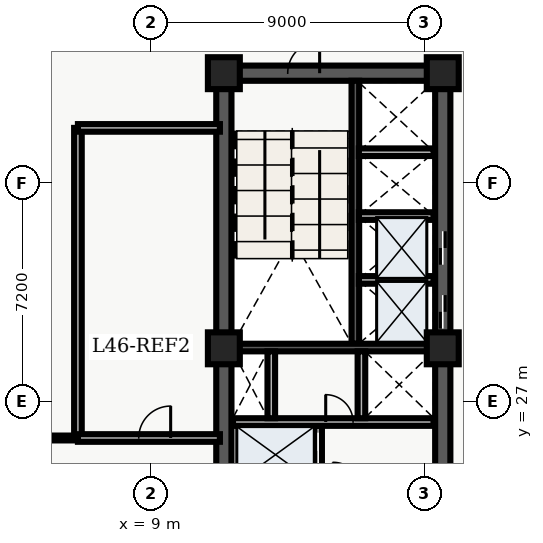
"""IFC4 building model, lengths in metres.
Left out: names, types, materials, properties, quantities, classifications, styles, units other than length and angle.
Written with IfcOpenShell. Run it as: python <this file> out.ifc"""

import sys

from ifc_helpers import new_model, entity, si_unit, converted_unit, direction, frame, origin_with_axes, origin_2d_with_axis, place, context, subcontext, project, spatial, polyline, rectangle, outline, extrude, element, fill, save


model = new_model("IFC4")
c1 = context("Model", 3, precision=1e-05, world=origin_with_axes(), true_north=direction((0.0, 1.0)))
c2 = subcontext(c1, "Body", "Model", "MODEL_VIEW")
j1 = project(units=[si_unit("LENGTHUNIT", "METRE"), converted_unit("PLANEANGLEUNIT", "DEGREE", entity("IfcPlaneAngleMeasure", 0.017), si_unit("PLANEANGLEUNIT", "RADIAN"), dimensions=[0, 0, 0, 0, 0, 0, 0])], contexts=[c1])
p1 = place(None, origin_with_axes())
s1 = spatial("IfcSite", under=j1, at=p1, CompositionType="ELEMENT")
p2 = place(p1, origin_with_axes())
s2 = spatial("IfcBuilding", under=s1, at=p2, CompositionType="ELEMENT")
p3 = place(p2, frame((0.0, 0.0, 187.5), z_axis=(0.0, 0.0, 1.0), x_axis=(1.0, 0.0, 0.0)))
s3 = spatial("IfcBuildingStorey", under=s2, at=p3, CompositionType="ELEMENT", Elevation=187.5)
p4 = place(p3, frame((11.4, 10.8, 0.0), z_axis=(0.0, 0.0, 1.0), x_axis=(0.0, 1.0, 0.0)))
e1 = element("IfcWall", 1, at=p4, inside=s3, PredefinedType="SHEAR", context=c2, shape_type="SweptSolid", body=[
    extrude(outline(polyline([(0.0, -0.25), (27.0, -0.25), (27.0, 0.25), (0.0, 0.25), (0.0, -0.25)])), origin_with_axes(), (0.0, 0.0, 1.0), 4.86),
])
p5 = place(p3, frame((11.4, 37.8, 0.0), z_axis=(0.0, 0.0, 1.0), x_axis=(1.0, 0.0, 0.0)))
e2 = element("IfcWall", 2, at=p5, inside=s3, PredefinedType="SHEAR", context=c2, shape_type="SweptSolid", body=[
    extrude(outline(polyline([(0.0, -0.25), (7.2, -0.25), (7.2, 0.25), (0.0, 0.25), (0.0, -0.25)])), origin_with_axes(), (0.0, 0.0, 1.0), 4.86),
])
p6 = place(p5, frame((2.625, 0.0, 0.0), z_axis=(0.0, 0.0, 1.0), x_axis=(1.0, 0.0, 0.0)))
e3 = element("IfcOpeningElement", 3, at=p6, cuts=e2, PredefinedType="OPENING", context=c2, shape_type="SweptSolid", body=[
    extrude(rectangle(XDim=1.05, YDim=0.52, at=origin_2d_with_axis()), origin_with_axes(), (0.0, 0.0, 1.0), 2.15),
])
p7 = place(p3, frame((18.6, 24.3, 0.0), z_axis=(0.0, 0.0, 1.0), x_axis=(0.0, 1.0, 0.0)))
e4 = element("IfcWall", 4, at=p7, inside=s3, PredefinedType="SHEAR", context=c2, shape_type="SweptSolid", body=[
    extrude(outline(polyline([(0.0, -0.25), (13.5, -0.25), (13.5, 0.25), (0.0, 0.25), (0.0, -0.25)])), origin_with_axes(), (0.0, 0.0, 1.0), 4.86),
])
p8 = place(p7, frame((5.65, 0.0, 0.0), z_axis=(0.0, 0.0, 1.0), x_axis=(1.0, 0.0, 0.0)))
e5 = element("IfcOpeningElement", 5, at=p8, cuts=e4, PredefinedType="OPENING", context=c2, shape_type="SweptSolid", body=[
    extrude(rectangle(XDim=1.1, YDim=0.52, at=origin_2d_with_axis()), origin_with_axes(), (0.0, 0.0, 1.0), 2.15),
])
p9 = place(p7, frame((7.75, 0.0, 0.0), z_axis=(0.0, 0.0, 1.0), x_axis=(1.0, 0.0, 0.0)))
e6 = element("IfcOpeningElement", 6, at=p9, cuts=e4, PredefinedType="OPENING", context=c2, shape_type="SweptSolid", body=[
    extrude(rectangle(XDim=1.1, YDim=0.52, at=origin_2d_with_axis()), origin_with_axes(), (0.0, 0.0, 1.0), 2.15),
])
p10 = place(p3, frame((15.725, 28.9, 0.0), z_axis=(0.0, 0.0, 1.0), x_axis=(0.0, 1.0, 0.0)))
e7 = element("IfcWall", 7, at=p10, inside=s3, PredefinedType="SHEAR", context=c2, shape_type="SweptSolid", body=[
    extrude(outline(polyline([(0.0, -0.125), (8.65, -0.125), (8.65, 0.125), (0.0, 0.125), (0.0, -0.125)])), origin_with_axes(), (0.0, 0.0, 1.0), 4.86),
])
p11 = place(p3, frame((11.65, 28.775, 0.0), z_axis=(0.0, 0.0, 1.0), x_axis=(1.0, 0.0, 0.0)))
e8 = element("IfcWall", 8, at=p11, inside=s3, PredefinedType="SHEAR", context=c2, shape_type="SweptSolid", body=[
    extrude(outline(polyline([(0.0, -0.125), (6.7, -0.125), (6.7, 0.125), (0.0, 0.125), (0.0, -0.125)])), origin_with_axes(), (0.0, 0.0, 1.0), 4.86),
])
p12 = place(p3, frame((14.5, 19.95, 0.0), z_axis=(0.0, 0.0, 1.0), x_axis=(0.0, 1.0, 0.0)))
e9 = element("IfcWall", 9, at=p12, inside=s3, PredefinedType="SOLIDWALL", context=c2, shape_type="SweptSolid", body=[
    extrude(outline(polyline([(0.0, -0.125), (6.25, -0.125), (6.25, 0.125), (0.0, 0.125), (0.0, -0.125)])), origin_with_axes(), (0.0, 0.0, 1.0), 3.6),
])
p13 = place(p12, frame((1.025, 0.0, 0.0), z_axis=(0.0, 0.0, 1.0), x_axis=(1.0, 0.0, 0.0)))
e10 = element("IfcOpeningElement", 10, at=p13, cuts=e9, PredefinedType="OPENING", context=c2, shape_type="SweptSolid", body=[
    extrude(rectangle(XDim=1.1, YDim=0.27, at=origin_2d_with_axis()), origin_with_axes(), (0.0, 0.0, 1.0), 2.15),
])
p14 = place(p12, frame((2.975, 0.0, 0.0), z_axis=(0.0, 0.0, 1.0), x_axis=(1.0, 0.0, 0.0)))
e11 = element("IfcOpeningElement", 11, at=p14, cuts=e9, PredefinedType="OPENING", context=c2, shape_type="SweptSolid", body=[
    extrude(rectangle(XDim=1.1, YDim=0.27, at=origin_2d_with_axis()), origin_with_axes(), (0.0, 0.0, 1.0), 2.15),
])
p15 = place(p12, frame((5.425, 0.0, 0.0), z_axis=(0.0, 0.0, 1.0), x_axis=(1.0, 0.0, 0.0)))
e12 = element("IfcOpeningElement", 12, at=p15, cuts=e9, PredefinedType="OPENING", context=c2, shape_type="SweptSolid", body=[
    extrude(rectangle(XDim=1.2, YDim=0.27, at=origin_2d_with_axis()), origin_with_axes(), (0.0, 0.0, 1.0), 2.15),
])
p16 = place(p3, frame((11.7, 26.325, 0.0), z_axis=(0.0, 0.0, 1.0), x_axis=(1.0, 0.0, 0.0)))
e13 = element("IfcWall", 13, at=p16, inside=s3, PredefinedType="SOLIDWALL", context=c2, shape_type="SweptSolid", body=[
    extrude(outline(polyline([(0.0, -0.125), (6.6, -0.125), (6.6, 0.125), (0.0, 0.125), (0.0, -0.125)])), origin_with_axes(), (0.0, 0.0, 1.0), 3.6),
])
p17 = place(p16, frame((3.5, 0.0, 0.0), z_axis=(0.0, 0.0, 1.0), x_axis=(1.0, 0.0, 0.0)))
e14 = element("IfcOpeningElement", 14, at=p17, cuts=e13, PredefinedType="OPENING", context=c2, shape_type="SweptSolid", body=[
    extrude(rectangle(XDim=0.9, YDim=0.27, at=origin_2d_with_axis()), origin_with_axes(), (0.0, 0.0, 1.0), 2.15),
])
for number, where, z_axis, x_axis in (
    (15, (12.96, 26.45, 0.0), (0.0, 0.0, 1.0), (0.0, 1.0, 0.0)),
    (16, (15.925, 26.45, 0.0), (0.0, 0.0, 1.0), (0.0, 1.0, 0.0)),
):
    element("IfcWall", number, at=place(p3, frame(where, z_axis=z_axis, x_axis=x_axis)), inside=s3, PredefinedType="SOLIDWALL", context=c2, shape_type="SweptSolid", body=[
        extrude(outline(polyline([(0.0, -0.125), (2.2, -0.125), (2.2, 0.125), (0.0, 0.125), (0.0, -0.125)])), origin_with_axes(), (0.0, 0.0, 1.0), 3.6),
    ])
for number, where, z_axis, x_axis in (
    (17, (11.4, 28.75, 0.0), (0.0, 0.0, 1.0), (1.0, 0.0, 0.0)),
    (18, (11.4, 37.8, 0.0), (0.0, 0.0, 1.0), (1.0, 0.0, 0.0)),
    (19, (18.6, 28.75, 0.0), (0.0, 0.0, 1.0), (1.0, 0.0, 0.0)),
    (20, (18.6, 37.8, 0.0), (0.0, 0.0, 1.0), (1.0, 0.0, 0.0)),
):
    element("IfcColumn", number, at=place(p3, frame(where, z_axis=z_axis, x_axis=x_axis)), inside=s3, PredefinedType="COLUMN", context=c2, shape_type="SweptSolid", body=[
        extrude(rectangle(XDim=1.05, YDim=1.05, at=origin_2d_with_axis()), origin_with_axes(), (0.0, 0.0, 1.0), 5.1),
    ])
for number, where, z_axis, x_axis in (
    (21, (15.84, 31.0, 0.0), (0.0, 0.0, 1.0), (1.0, 0.0, 0.0)),
    (22, (15.84, 33.1, 0.0), (0.0, 0.0, 1.0), (1.0, 0.0, 0.0)),
    (23, (15.84, 35.2, 0.0), (0.0, 0.0, 1.0), (1.0, 0.0, 0.0)),
):
    element("IfcWall", number, at=place(p3, frame(where, z_axis=z_axis, x_axis=x_axis)), inside=s3, PredefinedType="SOLIDWALL", context=c2, shape_type="SweptSolid", body=[
        extrude(outline(polyline([(0.0, -0.125), (2.46, -0.125), (2.46, 0.125), (0.0, 0.125), (0.0, -0.125)])), origin_with_axes(), (0.0, 0.0, 1.0), 3.2),
    ])
p18 = place(p3, frame((4.8, 25.8, 0.0), z_axis=(0.0, 0.0, 1.0), x_axis=(1.0, 0.0, 0.0)))
e24 = element("IfcWall", 24, at=p18, inside=s3, PredefinedType="PARTITIONING", context=c2, shape_type="SweptSolid", body=[
    extrude(outline(polyline([(0.0, -0.08), (1.8, -0.08), (1.8, 0.08), (0.0, 0.08), (0.0, -0.08)])), origin_with_axes(), (0.0, 0.0, 1.0), 3.2),
])
p19 = place(p3, frame((6.6, 25.8, 0.0), z_axis=(0.0, 0.0, 1.0), x_axis=(0.0, 1.0, 0.0)))
e25 = element("IfcWall", 25, at=p19, inside=s3, PredefinedType="SOLIDWALL", context=c2, shape_type="SweptSolid", body=[
    extrude(outline(polyline([(0.0, -0.125), (10.2, -0.125), (10.2, 0.125), (0.0, 0.125), (0.0, -0.125)])), origin_with_axes(), (0.0, 0.0, 1.0), 3.2),
])
p20 = place(p3, frame((6.6, 25.8, 0.0), z_axis=(0.0, 0.0, 1.0), x_axis=(1.0, 0.0, 0.0)))
e26 = element("IfcWall", 26, at=p20, inside=s3, PredefinedType="SOLIDWALL", context=c2, shape_type="SweptSolid", body=[
    extrude(outline(polyline([(0.0, -0.125), (4.67, -0.125), (4.67, 0.125), (0.0, 0.125), (0.0, -0.125)])), origin_with_axes(), (0.0, 0.0, 1.0), 3.2),
])
p21 = place(p20, frame((2.525, 0.0, 0.0), z_axis=(0.0, 0.0, 1.0), x_axis=(1.0, 0.0, 0.0)))
e27 = element("IfcOpeningElement", 27, at=p21, cuts=e26, PredefinedType="OPENING", context=c2, shape_type="SweptSolid", body=[
    extrude(rectangle(XDim=1.05, YDim=0.27, at=origin_2d_with_axis()), origin_with_axes(), (0.0, 0.0, 1.0), 2.15),
])
p22 = place(p3, frame((6.6, 36.0, 0.0), z_axis=(0.0, 0.0, 1.0), x_axis=(1.0, 0.0, 0.0)))
e28 = element("IfcWall", 28, at=p22, inside=s3, PredefinedType="SOLIDWALL", context=c2, shape_type="SweptSolid", body=[
    extrude(outline(polyline([(0.0, -0.125), (4.67, -0.125), (4.67, 0.125), (0.0, 0.125), (0.0, -0.125)])), origin_with_axes(), (0.0, 0.0, 1.0), 3.2),
])
p23 = place(p7, frame((5.65, 0.0, 0.0), z_axis=(0.0, 0.0, 1.0), x_axis=(1.0, 0.0, 0.0)))
e29 = element("IfcDoor", 29, at=p23, inside=s3, OperationType="SLIDING_TO_LEFT", PredefinedType="DOOR", context=c2, shape_type="SweptSolid", body=[
    extrude(rectangle(XDim=1.1, YDim=0.09, at=origin_2d_with_axis()), origin_with_axes(), (0.0, 0.0, 1.0), 2.15),
])
fill(e5, e29)
p24 = place(p7, frame((7.75, 0.0, 0.0), z_axis=(0.0, 0.0, 1.0), x_axis=(1.0, 0.0, 0.0)))
e30 = element("IfcDoor", 30, at=p24, inside=s3, OperationType="SLIDING_TO_RIGHT", PredefinedType="DOOR", context=c2, shape_type="SweptSolid", body=[
    extrude(rectangle(XDim=1.1, YDim=0.09, at=origin_2d_with_axis()), origin_with_axes(), (0.0, 0.0, 1.0), 2.15),
])
fill(e6, e30)
p25 = place(p12, frame((5.425, 0.0, 0.0), z_axis=(0.0, 0.0, 1.0), x_axis=(1.0, 0.0, 0.0)))
e31 = element("IfcDoor", 31, at=p25, inside=s3, OperationType="DOUBLE_DOOR_SLIDING", PredefinedType="DOOR", context=c2, shape_type="SweptSolid", body=[
    extrude(rectangle(XDim=1.2, YDim=0.09, at=origin_2d_with_axis()), origin_with_axes(), (0.0, 0.0, 1.0), 2.15),
])
fill(e12, e31)
p26 = place(p5, frame((2.625, 0.0, 0.0), z_axis=(0.0, 0.0, 1.0), x_axis=(1.0, 0.0, 0.0)))
e32 = element("IfcDoor", 32, at=p26, inside=s3, OperationType="SINGLE_SWING_RIGHT", PredefinedType="DOOR", context=c2, shape_type="SweptSolid", body=[
    extrude(rectangle(XDim=1.05, YDim=0.09, at=origin_2d_with_axis()), origin_with_axes(), (0.0, 0.0, 1.0), 2.15),
])
fill(e3, e32)
p27 = place(p16, frame((3.5, 0.0, 0.0), z_axis=(0.0, 0.0, 1.0), x_axis=(1.0, 0.0, 0.0)))
e33 = element("IfcDoor", 33, at=p27, inside=s3, OperationType="SINGLE_SWING_LEFT", PredefinedType="DOOR", context=c2, shape_type="SweptSolid", body=[
    extrude(rectangle(XDim=0.9, YDim=0.09, at=origin_2d_with_axis()), origin_with_axes(), (0.0, 0.0, 1.0), 2.15),
])
fill(e14, e33)
p28 = place(p20, frame((2.525, 0.0, 0.0), z_axis=(0.0, 0.0, 1.0), x_axis=(1.0, 0.0, 0.0)))
e34 = element("IfcDoor", 34, at=p28, inside=s3, OperationType="SINGLE_SWING_RIGHT", PredefinedType="DOOR", context=c2, shape_type="SweptSolid", body=[
    extrude(rectangle(XDim=1.05, YDim=0.09, at=origin_2d_with_axis()), origin_with_axes(), (0.0, 0.0, 1.0), 2.15),
])
fill(e27, e34)
save(model, sys.argv[1])
